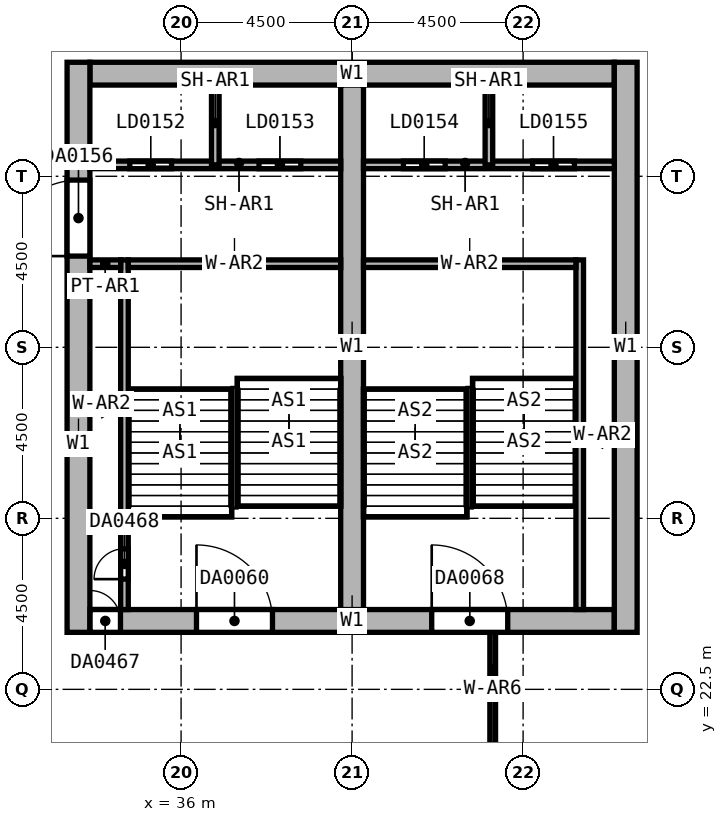
"""IFC4 building model, lengths in metres.
Left out: names, types, materials, properties, quantities, classifications, styles, units other than length and angle.
Written with IfcOpenShell. Run it as: python <this file> out.ifc"""

import sys

from ifc_helpers import new_model, si_unit, direction, frame, frame_2d, origin, place, context, subcontext, project, spatial, rectangle, extrude, element, fill, save


model = new_model("IFC4")
c1 = context("Model", 3, precision=1e-05, world=origin(), true_north=direction((0.0, 1.0)))
c2 = subcontext(c1, "Body", "Model", "MODEL_VIEW")
j1 = project(units=[si_unit("LENGTHUNIT", "METRE"), si_unit("PLANEANGLEUNIT", "RADIAN")], contexts=[c1])
p1 = place(None, origin())
s1 = spatial("IfcSite", under=j1, at=p1, CompositionType="ELEMENT")
p2 = place(p1, origin())
s2 = spatial("IfcBuilding", under=s1, at=p2, CompositionType="ELEMENT")
p3 = place(p2, frame((0.0, 0.0, 52.0)))
s3 = spatial("IfcBuildingStorey", under=s2, at=p3, CompositionType="ELEMENT", Elevation=52.0)
p4 = place(p3, frame((33.6, 38.7, 0.0), z_axis=(0.0, 0.0, 1.0), x_axis=(1.0, 0.0, 0.0)))
e1 = element("IfcWall", 1, at=p4, inside=s3, PredefinedType="SHEAR", context=c2, shape_type="SweptSolid", body=[
    extrude(rectangle(XDim=13.8, YDim=0.6, at=frame_2d((6.9, 0.0))), origin(), (0.0, 0.0, 1.0), 8.0),
])
p5 = place(p3, frame((33.6, 24.3, 0.0), z_axis=(0.0, 0.0, 1.0), x_axis=(1.0, 0.0, 0.0)))
e2 = element("IfcWall", 2, at=p5, inside=s3, PredefinedType="SHEAR", context=c2, shape_type="SweptSolid", body=[
    extrude(rectangle(XDim=13.8, YDim=0.6, at=frame_2d((6.9, 0.0))), origin(), (0.0, 0.0, 1.0), 8.0),
])
p6 = place(p5, frame((2.805, 0.0, 0.0)))
e3 = element("IfcOpeningElement", 3, at=p6, cuts=e2, PredefinedType="OPENING", context=c2, shape_type="SweptSolid", body=[
    extrude(rectangle(XDim=2.0, YDim=2.4, at=frame_2d((1.0, 1.2))), frame((0.0, 0.3, 0.0), z_axis=(0.0, -1.0, 0.0), x_axis=(1.0, 0.0, 0.0)), (0.0, 0.0, 1.0), 0.6),
])
p7 = place(p5, frame((8.995, 0.0, 0.0)))
e4 = element("IfcOpeningElement", 4, at=p7, cuts=e2, PredefinedType="OPENING", context=c2, shape_type="SweptSolid", body=[
    extrude(rectangle(XDim=2.0, YDim=2.4, at=frame_2d((1.0, 1.2))), frame((0.0, 0.3, 0.0), z_axis=(0.0, -1.0, 0.0), x_axis=(1.0, 0.0, 0.0)), (0.0, 0.0, 1.0), 0.6),
])
p8 = place(p5, frame((0.005, 0.0, 0.0)))
e5 = element("IfcOpeningElement", 5, at=p8, cuts=e2, PredefinedType="OPENING", context=c2, shape_type="SweptSolid", body=[
    extrude(rectangle(XDim=0.8, YDim=2.1, at=frame_2d((0.4, 1.05))), frame((0.0, 0.3, 0.0), z_axis=(0.0, -1.0, 0.0), x_axis=(1.0, 0.0, 0.0)), (0.0, 0.0, 1.0), 0.6),
])
p9 = place(p3, frame((33.3, 24.0, 0.0), z_axis=(0.0, 0.0, 1.0), x_axis=(0.0, 1.0, 0.0)))
e6 = element("IfcWall", 6, at=p9, inside=s3, PredefinedType="SHEAR", context=c2, shape_type="SweptSolid", body=[
    extrude(rectangle(XDim=15.0, YDim=0.6, at=frame_2d((7.5, 0.0))), origin(), (0.0, 0.0, 1.0), 8.0),
])
p10 = place(p9, frame((9.9, 0.0, 0.0)))
e7 = element("IfcOpeningElement", 7, at=p10, cuts=e6, PredefinedType="OPENING", context=c2, shape_type="SweptSolid", body=[
    extrude(rectangle(XDim=2.0, YDim=2.4, at=frame_2d((1.0, 1.2))), frame((0.0, 0.3, 0.0), z_axis=(0.0, -1.0, 0.0), x_axis=(1.0, 0.0, 0.0)), (0.0, 0.0, 1.0), 0.6),
])
p11 = place(p3, frame((47.7, 24.0, 0.0), z_axis=(0.0, 0.0, 1.0), x_axis=(0.0, 1.0, 0.0)))
e8 = element("IfcWall", 8, at=p11, inside=s3, PredefinedType="SHEAR", context=c2, shape_type="SweptSolid", body=[
    extrude(rectangle(XDim=15.0, YDim=0.6, at=frame_2d((7.5, 0.0))), origin(), (0.0, 0.0, 1.0), 8.0),
])
p12 = place(p3, frame((40.5, 24.6, 0.0), z_axis=(0.0, 0.0, 1.0), x_axis=(0.0, 1.0, 0.0)))
e9 = element("IfcWall", 9, at=p12, inside=s3, PredefinedType="SHEAR", context=c2, shape_type="SweptSolid", body=[
    extrude(rectangle(XDim=13.8, YDim=0.6, at=frame_2d((6.9, 0.0))), origin(), (0.0, 0.0, 1.0), 8.0),
])
p13 = place(p3, frame((34.51, 24.6, 0.0), z_axis=(0.0, 0.0, 1.0), x_axis=(0.0, 1.0, 0.0)))
e10 = element("IfcWall", 10, at=p13, inside=s3, PredefinedType="SOLIDWALL", context=c2, shape_type="SweptSolid", body=[
    extrude(rectangle(XDim=9.2, YDim=0.2, at=frame_2d((4.6, 0.0))), origin(), (0.0, 0.0, 1.0), 8.0),
])
p14 = place(p13, frame((0.8, 0.0, 0.0)))
e11 = element("IfcOpeningElement", 11, at=p14, cuts=e10, PredefinedType="OPENING", context=c2, shape_type="SweptSolid", body=[
    extrude(rectangle(XDim=0.8, YDim=2.1, at=frame_2d((0.4, 1.05))), frame((0.0, 0.1, 0.0), z_axis=(0.0, -1.0, 0.0), x_axis=(1.0, 0.0, 0.0)), (0.0, 0.0, 1.0), 0.2),
])
p15 = place(p3, frame((34.61, 33.7, 0.0), z_axis=(0.0, 0.0, 1.0), x_axis=(1.0, 0.0, 0.0)))
e12 = element("IfcWall", 12, at=p15, inside=s3, PredefinedType="SOLIDWALL", context=c2, shape_type="SweptSolid", body=[
    extrude(rectangle(XDim=5.59, YDim=0.2, at=frame_2d((2.795, 0.0))), origin(), (0.0, 0.0, 1.0), 8.0),
])
p16 = place(p3, frame((46.49, 24.6, 0.0), z_axis=(0.0, 0.0, 1.0), x_axis=(0.0, 1.0, 0.0)))
e13 = element("IfcWall", 13, at=p16, inside=s3, PredefinedType="SOLIDWALL", context=c2, shape_type="SweptSolid", body=[
    extrude(rectangle(XDim=9.2, YDim=0.2, at=frame_2d((4.6, 0.0))), origin(), (0.0, 0.0, 1.0), 8.0),
])
p17 = place(p3, frame((40.8, 33.7, 0.0), z_axis=(0.0, 0.0, 1.0), x_axis=(1.0, 0.0, 0.0)))
e14 = element("IfcWall", 14, at=p17, inside=s3, PredefinedType="SOLIDWALL", context=c2, shape_type="SweptSolid", body=[
    extrude(rectangle(XDim=5.59, YDim=0.2, at=frame_2d((2.795, 0.0))), origin(), (0.0, 0.0, 1.0), 8.0),
])
p18 = place(p3, frame((33.6, 36.3, 0.0), z_axis=(0.0, 0.0, 1.0), x_axis=(1.0, 0.0, 0.0)))
e15 = element("IfcWall", 15, at=p18, inside=s3, PredefinedType="SHEAR", context=c2, shape_type="SweptSolid", body=[
    extrude(rectangle(XDim=6.6, YDim=0.2, at=frame_2d((3.3, 0.0))), origin(), (0.0, 0.0, 1.0), 8.0),
])
p19 = place(p18, frame((1.05, 0.0, 0.0)))
e16 = element("IfcOpeningElement", 16, at=p19, cuts=e15, PredefinedType="OPENING", context=c2, shape_type="SweptSolid", body=[
    extrude(rectangle(XDim=1.1, YDim=2.4, at=frame_2d((0.55, 1.2))), frame((0.0, 0.1, 0.0), z_axis=(0.0, -1.0, 0.0), x_axis=(1.0, 0.0, 0.0)), (0.0, 0.0, 1.0), 0.2),
])
p20 = place(p18, frame((4.45, 0.0, 0.0)))
e17 = element("IfcOpeningElement", 17, at=p20, cuts=e15, PredefinedType="OPENING", context=c2, shape_type="SweptSolid", body=[
    extrude(rectangle(XDim=1.1, YDim=2.4, at=frame_2d((0.55, 1.2))), frame((0.0, 0.1, 0.0), z_axis=(0.0, -1.0, 0.0), x_axis=(1.0, 0.0, 0.0)), (0.0, 0.0, 1.0), 0.2),
])
p21 = place(p3, frame((40.8, 36.3, 0.0), z_axis=(0.0, 0.0, 1.0), x_axis=(1.0, 0.0, 0.0)))
e18 = element("IfcWall", 18, at=p21, inside=s3, PredefinedType="SHEAR", context=c2, shape_type="SweptSolid", body=[
    extrude(rectangle(XDim=6.6, YDim=0.2, at=frame_2d((3.3, 0.0))), origin(), (0.0, 0.0, 1.0), 8.0),
])
p22 = place(p21, frame((1.05, 0.0, 0.0)))
e19 = element("IfcOpeningElement", 19, at=p22, cuts=e18, PredefinedType="OPENING", context=c2, shape_type="SweptSolid", body=[
    extrude(rectangle(XDim=1.1, YDim=2.4, at=frame_2d((0.55, 1.2))), frame((0.0, 0.1, 0.0), z_axis=(0.0, -1.0, 0.0), x_axis=(1.0, 0.0, 0.0)), (0.0, 0.0, 1.0), 0.2),
])
p23 = place(p21, frame((4.45, 0.0, 0.0)))
e20 = element("IfcOpeningElement", 20, at=p23, cuts=e18, PredefinedType="OPENING", context=c2, shape_type="SweptSolid", body=[
    extrude(rectangle(XDim=1.1, YDim=2.4, at=frame_2d((0.55, 1.2))), frame((0.0, 0.1, 0.0), z_axis=(0.0, -1.0, 0.0), x_axis=(1.0, 0.0, 0.0)), (0.0, 0.0, 1.0), 0.2),
])
for number, where, z_axis, x_axis in (
    (21, (36.9, 36.3, 0.0), (0.0, 0.0, 1.0), (0.0, 1.0, 0.0)),
    (22, (44.1, 36.3, 0.0), (0.0, 0.0, 1.0), (0.0, 1.0, 0.0)),
):
    element("IfcWall", number, at=place(p3, frame(where, z_axis=z_axis, x_axis=x_axis)), inside=s3, PredefinedType="SHEAR", context=c2, shape_type="SweptSolid", body=[
        extrude(rectangle(XDim=2.1, YDim=0.2, at=frame_2d((1.05, 0.0))), origin(), (0.0, 0.0, 1.0), 8.0),
    ])
p24 = place(p3, frame((33.6, 33.7, 0.0), z_axis=(0.0, 0.0, 1.0), x_axis=(1.0, 0.0, 0.0)))
e23 = element("IfcWall", 23, at=p24, inside=s3, PredefinedType="PARTITIONING", context=c2, shape_type="SweptSolid", body=[
    extrude(rectangle(XDim=0.81, YDim=0.2, at=frame_2d((0.405, 0.0))), origin(), (0.0, 0.0, 1.0), 8.0),
])
p25 = place(p3, frame((44.2, 21.0, 0.0), z_axis=(0.0, 0.0, 1.0), x_axis=(0.0, 1.0, 0.0)))
e24 = element("IfcWall", 24, at=p25, inside=s3, PredefinedType="SOLIDWALL", context=c2, shape_type="SweptSolid", body=[
    extrude(rectangle(XDim=3.0, YDim=0.15, at=frame_2d((1.5, 0.0))), origin(), (0.0, 0.0, 1.0), 7.7),
])
p26 = place(p6, origin())
e25 = element("IfcDoor", 25, at=p26, inside=s3, OperationType="DOUBLE_DOOR_SINGLE_SWING", PredefinedType="DOOR", context=c2, shape_type="SweptSolid", body=[
    extrude(rectangle(XDim=2.0, YDim=2.4, at=frame_2d((1.0, 1.2))), frame((0.0, 0.025, 0.0), z_axis=(0.0, -1.0, 0.0), x_axis=(1.0, 0.0, 0.0)), (0.0, 0.0, 1.0), 0.05),
])
fill(e3, e25)
p27 = place(p7, origin())
e26 = element("IfcDoor", 26, at=p27, inside=s3, OperationType="DOUBLE_DOOR_SINGLE_SWING", PredefinedType="DOOR", context=c2, shape_type="SweptSolid", body=[
    extrude(rectangle(XDim=2.0, YDim=2.4, at=frame_2d((1.0, 1.2))), frame((0.0, 0.025, 0.0), z_axis=(0.0, -1.0, 0.0), x_axis=(1.0, 0.0, 0.0)), (0.0, 0.0, 1.0), 0.05),
])
fill(e4, e26)
p28 = place(p19, origin())
e27 = element("IfcDoor", 27, at=p28, inside=s3, OperationType="DOUBLE_DOOR_SLIDING", PredefinedType="DOOR", context=c2, shape_type="SweptSolid", body=[
    extrude(rectangle(XDim=1.1, YDim=2.4, at=frame_2d((0.55, 1.2))), frame((0.0, 0.025, 0.0), z_axis=(0.0, -1.0, 0.0), x_axis=(1.0, 0.0, 0.0)), (0.0, 0.0, 1.0), 0.05),
])
fill(e16, e27)
p29 = place(p20, origin())
e28 = element("IfcDoor", 28, at=p29, inside=s3, OperationType="DOUBLE_DOOR_SLIDING", PredefinedType="DOOR", context=c2, shape_type="SweptSolid", body=[
    extrude(rectangle(XDim=1.1, YDim=2.4, at=frame_2d((0.55, 1.2))), frame((0.0, 0.025, 0.0), z_axis=(0.0, -1.0, 0.0), x_axis=(1.0, 0.0, 0.0)), (0.0, 0.0, 1.0), 0.05),
])
fill(e17, e28)
p30 = place(p22, origin())
e29 = element("IfcDoor", 29, at=p30, inside=s3, OperationType="DOUBLE_DOOR_SLIDING", PredefinedType="DOOR", context=c2, shape_type="SweptSolid", body=[
    extrude(rectangle(XDim=1.1, YDim=2.4, at=frame_2d((0.55, 1.2))), frame((0.0, 0.025, 0.0), z_axis=(0.0, -1.0, 0.0), x_axis=(1.0, 0.0, 0.0)), (0.0, 0.0, 1.0), 0.05),
])
fill(e19, e29)
p31 = place(p23, origin())
e30 = element("IfcDoor", 30, at=p31, inside=s3, OperationType="DOUBLE_DOOR_SLIDING", PredefinedType="DOOR", context=c2, shape_type="SweptSolid", body=[
    extrude(rectangle(XDim=1.1, YDim=2.4, at=frame_2d((0.55, 1.2))), frame((0.0, 0.025, 0.0), z_axis=(0.0, -1.0, 0.0), x_axis=(1.0, 0.0, 0.0)), (0.0, 0.0, 1.0), 0.05),
])
fill(e20, e30)
p32 = place(p10, origin())
e31 = element("IfcDoor", 31, at=p32, inside=s3, OperationType="DOUBLE_DOOR_SINGLE_SWING", PredefinedType="DOOR", context=c2, shape_type="SweptSolid", body=[
    extrude(rectangle(XDim=2.0, YDim=2.4, at=frame_2d((1.0, 1.2))), frame((0.0, 0.025, 0.0), z_axis=(0.0, -1.0, 0.0), x_axis=(1.0, 0.0, 0.0)), (0.0, 0.0, 1.0), 0.05),
])
fill(e7, e31)
p33 = place(p8, origin())
e32 = element("IfcDoor", 32, at=p33, inside=s3, OperationType="SINGLE_SWING_LEFT", PredefinedType="DOOR", context=c2, shape_type="SweptSolid", body=[
    extrude(rectangle(XDim=0.8, YDim=2.1, at=frame_2d((0.4, 1.05))), frame((0.0, 0.025, 0.0), z_axis=(0.0, -1.0, 0.0), x_axis=(1.0, 0.0, 0.0)), (0.0, 0.0, 1.0), 0.05),
])
fill(e5, e32)
p34 = place(p14, origin())
e33 = element("IfcDoor", 33, at=p34, inside=s3, OperationType="SINGLE_SWING_LEFT", PredefinedType="DOOR", context=c2, shape_type="SweptSolid", body=[
    extrude(rectangle(XDim=0.8, YDim=2.1, at=frame_2d((0.4, 1.05))), frame((0.0, 0.025, 0.0), z_axis=(0.0, -1.0, 0.0), x_axis=(1.0, 0.0, 0.0)), (0.0, 0.0, 1.0), 0.05),
])
fill(e11, e33)
save(model, sys.argv[1])
